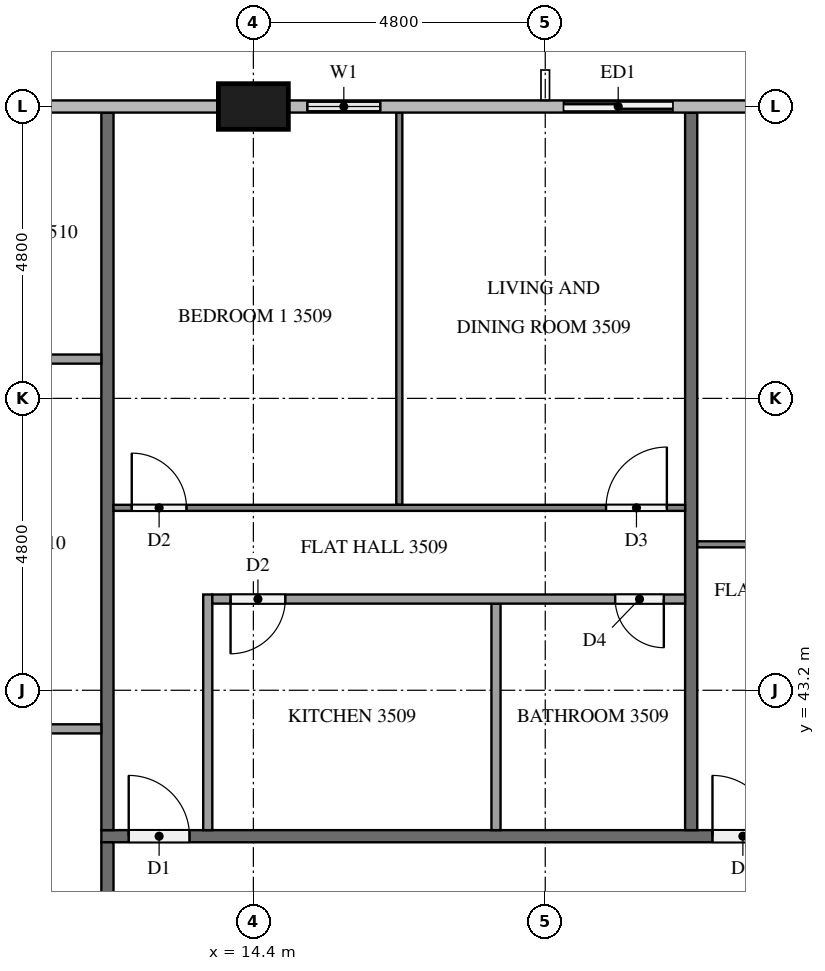
"""IFC4 building model, lengths in metres.
Left out: names, types, materials, properties, quantities, classifications, styles, units other than length and angle.
Written with IfcOpenShell. Run it as: python <this file> out.ifc"""

import sys

from ifc_helpers import new_model, si_unit, direction, frame, frame_2d, origin, origin_2d, place, context, subcontext, project, spatial, rectangle, extrude, element, fill, save


model = new_model("IFC4")
c1 = context("Model", 3, precision=1e-05, world=origin(), true_north=direction((0.0, 1.0)))
c2 = subcontext(c1, "Body", "Model", "MODEL_VIEW")
j1 = project(units=[si_unit("LENGTHUNIT", "METRE"), si_unit("PLANEANGLEUNIT", "RADIAN")], contexts=[c1])
p1 = place(None, origin())
s1 = spatial("IfcSite", under=j1, at=p1, CompositionType="ELEMENT")
p2 = place(p1, origin())
s2 = spatial("IfcBuilding", under=s1, at=p2, CompositionType="ELEMENT")
p3 = place(p2, frame((0.0, 0.0, 136.6)))
s3 = spatial("IfcBuildingStorey", under=s2, at=p3, CompositionType="ELEMENT", Elevation=136.6)
p4 = place(p3, frame((14.4, 52.8, 0.0), z_axis=(0.0, 0.0, 1.0), x_axis=(1.0, 0.0, 0.0)))
e1 = element("IfcColumn", 1, at=p4, inside=s3, PredefinedType="COLUMN", context=c2, shape_type="SweptSolid", body=[
    extrude(rectangle(XDim=1.15, YDim=0.75, at=origin_2d()), origin(), (0.0, 0.0, 1.0), 3.2),
])
p5 = place(p3, frame((21.6, 52.8, 0.0), z_axis=(0.0, 0.0, 1.0), x_axis=(-1.0, 0.0, 0.0)))
e2 = element("IfcWall", 2, at=p5, inside=s3, PredefinedType="SOLIDWALL", context=c2, shape_type="SweptSolid", body=[
    extrude(rectangle(XDim=2.4, YDim=0.15, at=frame_2d((1.2, 0.0))), origin(), (0.0, 0.0, 1.0), 3.2),
])
p6 = place(p5, frame((0.3, 0.0, 0.0)))
e3 = element("IfcOpeningElement", 3, at=p6, cuts=e2, PredefinedType="OPENING", context=c2, shape_type="SweptSolid", body=[
    extrude(rectangle(XDim=1.8, YDim=2.4, at=frame_2d((0.9, 1.2))), frame((0.0, 0.085, 0.0), z_axis=(0.0, -1.0, 0.0), x_axis=(1.0, 0.0, 0.0)), (0.0, 0.0, 1.0), 0.17),
])
p7 = place(p3, frame((16.8, 52.8, 0.0), z_axis=(0.0, 0.0, 1.0), x_axis=(-1.0, 0.0, 0.0)))
e4 = element("IfcWall", 4, at=p7, inside=s3, PredefinedType="SOLIDWALL", context=c2, shape_type="SweptSolid", body=[
    extrude(rectangle(XDim=1.825, YDim=0.15, at=frame_2d((0.913, 0.0))), origin(), (0.0, 0.0, 1.0), 3.2),
])
p8 = place(p7, frame((0.312, 0.0, 0.9)))
e5 = element("IfcOpeningElement", 5, at=p8, cuts=e4, PredefinedType="OPENING", context=c2, shape_type="SweptSolid", body=[
    extrude(rectangle(XDim=1.2, YDim=1.4, at=frame_2d((0.6, 0.7))), frame((0.0, 0.085, 0.0), z_axis=(0.0, -1.0, 0.0), x_axis=(1.0, 0.0, 0.0)), (0.0, 0.0, 1.0), 0.17),
])
p9 = place(p3, frame((11.9, 40.8, 0.0), z_axis=(0.0, 0.0, 1.0), x_axis=(1.0, 0.0, 0.0)))
e6 = element("IfcWall", 6, at=p9, inside=s3, PredefinedType="PARTITIONING", context=c2, shape_type="SweptSolid", body=[
    extrude(rectangle(XDim=38.6, YDim=0.2, at=frame_2d((19.3, 0.0))), origin(), (0.0, 0.0, 1.0), 3.2),
])
p10 = place(p9, frame((37.15, 0.0, 0.0)))
e7 = element("IfcOpeningElement", 7, at=p10, cuts=e6, PredefinedType="OPENING", context=c2, shape_type="SweptSolid", body=[
    extrude(rectangle(XDim=1.0, YDim=2.1, at=frame_2d((0.5, 1.05))), frame((0.0, 0.11, 0.0), z_axis=(0.0, -1.0, 0.0), x_axis=(1.0, 0.0, 0.0)), (0.0, 0.0, 1.0), 0.22),
])
p11 = place(p9, frame((10.05, 0.0, 0.0)))
e8 = element("IfcOpeningElement", 8, at=p11, cuts=e6, PredefinedType="OPENING", context=c2, shape_type="SweptSolid", body=[
    extrude(rectangle(XDim=1.0, YDim=2.1, at=frame_2d((0.5, 1.05))), frame((0.0, 0.11, 0.0), z_axis=(0.0, -1.0, 0.0), x_axis=(1.0, 0.0, 0.0)), (0.0, 0.0, 1.0), 0.22),
])
p12 = place(p9, frame((0.45, 0.0, 0.0)))
e9 = element("IfcOpeningElement", 9, at=p12, cuts=e6, PredefinedType="OPENING", context=c2, shape_type="SweptSolid", body=[
    extrude(rectangle(XDim=1.0, YDim=2.1, at=frame_2d((0.5, 1.05))), frame((0.0, 0.11, 0.0), z_axis=(0.0, -1.0, 0.0), x_axis=(1.0, 0.0, 0.0)), (0.0, 0.0, 1.0), 0.22),
])
p13 = place(p3, frame((12.0, 37.9, 0.0), z_axis=(0.0, 0.0, 1.0), x_axis=(0.0, 1.0, 0.0)))
e10 = element("IfcWall", 10, at=p13, inside=s3, PredefinedType="PARTITIONING", context=c2, shape_type="SweptSolid", body=[
    extrude(rectangle(XDim=2.8, YDim=0.2, at=frame_2d((1.4, 0.0))), origin(), (0.0, 0.0, 1.0), 3.2),
])
p14 = place(p13, frame((0.25, 0.0, 0.0)))
e11 = element("IfcOpeningElement", 11, at=p14, cuts=e10, PredefinedType="OPENING", context=c2, shape_type="SweptSolid", body=[
    extrude(rectangle(XDim=1.0, YDim=2.1, at=frame_2d((0.5, 1.05))), frame((0.0, 0.11, 0.0), z_axis=(0.0, -1.0, 0.0), x_axis=(1.0, 0.0, 0.0)), (0.0, 0.0, 1.0), 0.22),
])
for number, where, z_axis, x_axis in (
    (12, (21.6, 52.7, 0.0), (0.0, 0.0, 1.0), (0.0, -1.0, 0.0)),
    (13, (12.0, 52.7, 0.0), (0.0, 0.0, 1.0), (0.0, -1.0, 0.0)),
):
    element("IfcWall", number, at=place(p3, frame(where, z_axis=z_axis, x_axis=x_axis)), inside=s3, PredefinedType="PARTITIONING", context=c2, shape_type="SweptSolid", body=[
        extrude(rectangle(XDim=11.8, YDim=0.2, at=frame_2d((5.9, 0.0))), origin(), (0.0, 0.0, 1.0), 3.2),
    ])
p15 = place(p3, frame((21.7, 45.6, 0.0), z_axis=(0.0, 0.0, 1.0), x_axis=(1.0, 0.0, 0.0)))
e14 = element("IfcWall", 14, at=p15, inside=s3, PredefinedType="PARTITIONING", context=c2, shape_type="SweptSolid", body=[
    extrude(rectangle(XDim=14.2, YDim=0.1, at=frame_2d((7.1, 0.0))), origin(), (0.0, 0.0, 1.0), 3.2),
])
p16 = place(p15, frame((3.45, 0.0, 0.0)))
e15 = element("IfcOpeningElement", 15, at=p16, cuts=e14, PredefinedType="OPENING", context=c2, shape_type="SweptSolid", body=[
    extrude(rectangle(XDim=0.9, YDim=2.1, at=frame_2d((0.45, 1.05))), frame((0.0, 0.06, 0.0), z_axis=(0.0, -1.0, 0.0), x_axis=(1.0, 0.0, 0.0)), (0.0, 0.0, 1.0), 0.12),
])
p17 = place(p15, frame((5.05, 0.0, 0.0)))
e16 = element("IfcOpeningElement", 16, at=p17, cuts=e14, PredefinedType="OPENING", context=c2, shape_type="SweptSolid", body=[
    extrude(rectangle(XDim=0.9, YDim=2.1, at=frame_2d((0.45, 1.05))), frame((0.0, 0.06, 0.0), z_axis=(0.0, -1.0, 0.0), x_axis=(1.0, 0.0, 0.0)), (0.0, 0.0, 1.0), 0.12),
])
p18 = place(p15, frame((12.9, 0.0, 0.0)))
e17 = element("IfcOpeningElement", 17, at=p18, cuts=e14, PredefinedType="OPENING", context=c2, shape_type="SweptSolid", body=[
    extrude(rectangle(XDim=1.0, YDim=2.1, at=frame_2d((0.5, 1.05))), frame((0.0, 0.06, 0.0), z_axis=(0.0, -1.0, 0.0), x_axis=(1.0, 0.0, 0.0)), (0.0, 0.0, 1.0), 0.12),
])
p19 = place(p3, frame((16.8, 46.25, 0.0), z_axis=(0.0, 0.0, 1.0), x_axis=(0.0, 1.0, 0.0)))
e18 = element("IfcWall", 18, at=p19, inside=s3, PredefinedType="PARTITIONING", context=c2, shape_type="SweptSolid", body=[
    extrude(rectangle(XDim=6.45, YDim=0.1, at=frame_2d((3.225, 0.0))), origin(), (0.0, 0.0, 1.0), 3.2),
])
p20 = place(p3, frame((12.1, 46.2, 0.0), z_axis=(0.0, 0.0, 1.0), x_axis=(1.0, 0.0, 0.0)))
e19 = element("IfcWall", 19, at=p20, inside=s3, PredefinedType="PARTITIONING", context=c2, shape_type="SweptSolid", body=[
    extrude(rectangle(XDim=9.4, YDim=0.1, at=frame_2d((4.7, 0.0))), origin(), (0.0, 0.0, 1.0), 3.2),
])
p21 = place(p20, frame((0.3, 0.0, 0.0)))
e20 = element("IfcOpeningElement", 20, at=p21, cuts=e19, PredefinedType="OPENING", context=c2, shape_type="SweptSolid", body=[
    extrude(rectangle(XDim=0.9, YDim=2.1, at=frame_2d((0.45, 1.05))), frame((0.0, 0.06, 0.0), z_axis=(0.0, -1.0, 0.0), x_axis=(1.0, 0.0, 0.0)), (0.0, 0.0, 1.0), 0.12),
])
p22 = place(p20, frame((8.1, 0.0, 0.0)))
e21 = element("IfcOpeningElement", 21, at=p22, cuts=e19, PredefinedType="OPENING", context=c2, shape_type="SweptSolid", body=[
    extrude(rectangle(XDim=1.0, YDim=2.1, at=frame_2d((0.5, 1.05))), frame((0.0, 0.06, 0.0), z_axis=(0.0, -1.0, 0.0), x_axis=(1.0, 0.0, 0.0)), (0.0, 0.0, 1.0), 0.12),
])
p23 = place(p3, frame((18.39, 40.9, 0.0), z_axis=(0.0, 0.0, 1.0), x_axis=(0.0, 1.0, 0.0)))
e22 = element("IfcWall", 22, at=p23, inside=s3, PredefinedType="PARTITIONING", context=c2, shape_type="SweptSolid", body=[
    extrude(rectangle(XDim=3.725, YDim=0.15, at=frame_2d((1.863, 0.0))), origin(), (0.0, 0.0, 1.0), 3.2),
])
p24 = place(p3, frame((13.65, 40.9, 0.0), z_axis=(0.0, 0.0, 1.0), x_axis=(0.0, 1.0, 0.0)))
e23 = element("IfcWall", 23, at=p24, inside=s3, PredefinedType="PARTITIONING", context=c2, shape_type="SweptSolid", body=[
    extrude(rectangle(XDim=3.875, YDim=0.15, at=frame_2d((1.938, 0.0))), origin(), (0.0, 0.0, 1.0), 3.2),
])
p25 = place(p3, frame((21.5, 44.7, 0.0), z_axis=(0.0, 0.0, 1.0), x_axis=(-1.0, 0.0, 0.0)))
e24 = element("IfcWall", 24, at=p25, inside=s3, PredefinedType="PARTITIONING", context=c2, shape_type="SweptSolid", body=[
    extrude(rectangle(XDim=7.775, YDim=0.15, at=frame_2d((3.887, 0.0))), origin(), (0.0, 0.0, 1.0), 3.2),
])
p26 = place(p25, frame((6.575, 0.0, 0.0)))
e25 = element("IfcOpeningElement", 25, at=p26, cuts=e24, PredefinedType="OPENING", context=c2, shape_type="SweptSolid", body=[
    extrude(rectangle(XDim=0.9, YDim=2.1, at=frame_2d((0.45, 1.05))), frame((0.0, 0.085, 0.0), z_axis=(0.0, -1.0, 0.0), x_axis=(1.0, 0.0, 0.0)), (0.0, 0.0, 1.0), 0.17),
])
p27 = place(p25, frame((0.35, 0.0, 0.0)))
e26 = element("IfcOpeningElement", 26, at=p27, cuts=e24, PredefinedType="OPENING", context=c2, shape_type="SweptSolid", body=[
    extrude(rectangle(XDim=0.8, YDim=2.1, at=frame_2d((0.4, 1.05))), frame((0.0, 0.085, 0.0), z_axis=(0.0, -1.0, 0.0), x_axis=(1.0, 0.0, 0.0)), (0.0, 0.0, 1.0), 0.17),
])
for number, where, z_axis, x_axis in (
    (27, (11.9, 42.565, 0.0), (0.0, 0.0, 1.0), (-1.0, 0.0, 0.0)),
    (28, (11.9, 48.646, 0.0), (0.0, 0.0, 1.0), (-1.0, 0.0, 0.0)),
):
    element("IfcWall", number, at=place(p3, frame(where, z_axis=z_axis, x_axis=x_axis)), inside=s3, PredefinedType="PARTITIONING", context=c2, shape_type="SweptSolid", body=[
        extrude(rectangle(XDim=3.275, YDim=0.15, at=frame_2d((1.637, 0.0))), origin(), (0.0, 0.0, 1.0), 3.2),
    ])
p28 = place(p6, origin())
e29 = element("IfcDoor", 29, at=p28, inside=s3, OperationType="SLIDING_TO_RIGHT", PredefinedType="DOOR", context=c2, shape_type="SweptSolid", body=[
    extrude(rectangle(XDim=1.8, YDim=2.4, at=frame_2d((0.9, 1.2))), frame((0.0, 0.025, 0.0), z_axis=(0.0, -1.0, 0.0), x_axis=(1.0, 0.0, 0.0)), (0.0, 0.0, 1.0), 0.05),
])
fill(e3, e29)
p29 = place(p8, origin())
e30 = element("IfcWindow", 30, at=p29, inside=s3, PartitioningType="SINGLE_PANEL", PredefinedType="WINDOW", context=c2, shape_type="SweptSolid", body=[
    extrude(rectangle(XDim=1.2, YDim=1.4, at=frame_2d((0.6, 0.7))), frame((0.0, 0.03, 0.0), z_axis=(0.0, -1.0, 0.0), x_axis=(1.0, 0.0, 0.0)), (0.0, 0.0, 1.0), 0.06),
])
fill(e5, e30)
p30 = place(p11, origin())
e31 = element("IfcDoor", 31, at=p30, inside=s3, OperationType="SINGLE_SWING_LEFT", PredefinedType="DOOR", context=c2, shape_type="SweptSolid", body=[
    extrude(rectangle(XDim=1.0, YDim=2.1, at=frame_2d((0.5, 1.05))), frame((0.0, 0.025, 0.0), z_axis=(0.0, -1.0, 0.0), x_axis=(1.0, 0.0, 0.0)), (0.0, 0.0, 1.0), 0.05),
])
fill(e8, e31)
p31 = place(p12, origin())
e32 = element("IfcDoor", 32, at=p31, inside=s3, OperationType="SINGLE_SWING_LEFT", PredefinedType="DOOR", context=c2, shape_type="SweptSolid", body=[
    extrude(rectangle(XDim=1.0, YDim=2.1, at=frame_2d((0.5, 1.05))), frame((0.0, 0.025, 0.0), z_axis=(0.0, -1.0, 0.0), x_axis=(1.0, 0.0, 0.0)), (0.0, 0.0, 1.0), 0.05),
])
fill(e9, e32)
p32 = place(p21, origin())
e33 = element("IfcDoor", 33, at=p32, inside=s3, OperationType="SINGLE_SWING_LEFT", PredefinedType="DOOR", context=c2, shape_type="SweptSolid", body=[
    extrude(rectangle(XDim=0.9, YDim=2.1, at=frame_2d((0.45, 1.05))), frame((0.0, 0.025, 0.0), z_axis=(0.0, -1.0, 0.0), x_axis=(1.0, 0.0, 0.0)), (0.0, 0.0, 1.0), 0.05),
])
fill(e20, e33)
p33 = place(p22, origin())
e34 = element("IfcDoor", 34, at=p33, inside=s3, OperationType="SINGLE_SWING_RIGHT", PredefinedType="DOOR", context=c2, shape_type="SweptSolid", body=[
    extrude(rectangle(XDim=1.0, YDim=2.1, at=frame_2d((0.5, 1.05))), frame((0.0, 0.025, 0.0), z_axis=(0.0, -1.0, 0.0), x_axis=(1.0, 0.0, 0.0)), (0.0, 0.0, 1.0), 0.05),
])
fill(e21, e34)
p34 = place(p26, origin())
e35 = element("IfcDoor", 35, at=p34, inside=s3, OperationType="SINGLE_SWING_RIGHT", PredefinedType="DOOR", context=c2, shape_type="SweptSolid", body=[
    extrude(rectangle(XDim=0.9, YDim=2.1, at=frame_2d((0.45, 1.05))), frame((0.0, 0.025, 0.0), z_axis=(0.0, -1.0, 0.0), x_axis=(1.0, 0.0, 0.0)), (0.0, 0.0, 1.0), 0.05),
])
fill(e25, e35)
p35 = place(p27, origin())
e36 = element("IfcDoor", 36, at=p35, inside=s3, OperationType="SINGLE_SWING_LEFT", PredefinedType="DOOR", context=c2, shape_type="SweptSolid", body=[
    extrude(rectangle(XDim=0.8, YDim=2.1, at=frame_2d((0.4, 1.05))), frame((0.0, 0.025, 0.0), z_axis=(0.0, -1.0, 0.0), x_axis=(1.0, 0.0, 0.0)), (0.0, 0.0, 1.0), 0.05),
])
fill(e26, e36)
save(model, sys.argv[1])
